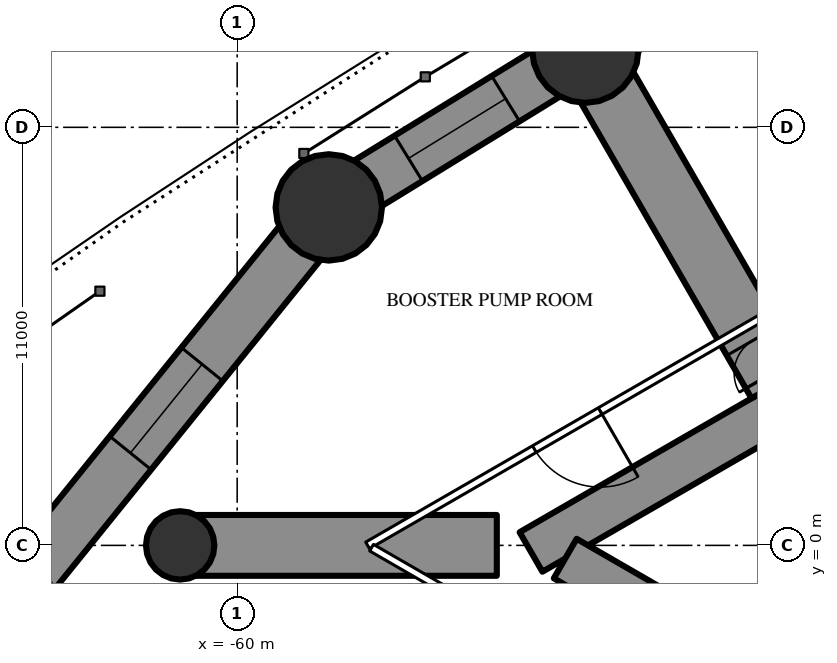
"""IFC4 building model, lengths in metres.
Left out: names, types, materials, properties, quantities, classifications, styles, units other than length and angle.
Written with IfcOpenShell. Run it as: python <this file> out.ifc"""

import sys

from ifc_helpers import new_model, si_unit, direction, frame, frame_2d, origin, origin_2d, place, context, subcontext, project, spatial, rectangle, circle, extrude, element, fill, save


model = new_model("IFC4")
c1 = context("Model", 3, precision=1e-05, world=origin(), true_north=direction((0.0, 1.0)))
c2 = subcontext(c1, "Body", "Model", "MODEL_VIEW")
j1 = project(units=[si_unit("LENGTHUNIT", "METRE"), si_unit("PLANEANGLEUNIT", "RADIAN")], contexts=[c1])
p1 = place(None, origin())
s1 = spatial("IfcSite", under=j1, at=p1, CompositionType="ELEMENT")
p2 = place(p1, origin())
s2 = spatial("IfcBuilding", under=s1, at=p2, CompositionType="ELEMENT")
p3 = place(p2, frame((0.0, 0.0, 152.7)))
s3 = spatial("IfcBuildingStorey", under=s2, at=p3, CompositionType="ELEMENT", Elevation=152.7)
for number, where, z_axis, x_axis in (
    (1, (-66.143, -1.695, 0.0), (0.0, 0.0, 1.0), (1.0, 0.0, 0.0)),
    (2, (-50.839, 13.043, 0.0), (0.0, 0.0, 1.0), (1.0, 0.0, 0.0)),
    (3, (-57.59, 8.893, 0.0), (0.0, 0.0, 1.0), (1.0, 0.0, 0.0)),
):
    element("IfcColumn", number, at=place(p3, frame(where, z_axis=z_axis, x_axis=x_axis)), inside=s3, PredefinedType="COLUMN", context=c2, shape_type="SweptSolid", body=[
        extrude(circle(Radius=1.4, at=origin_2d()), origin(), (0.0, 0.0, 1.0), 3.6),
    ])
p4 = place(p3, frame((-61.5, 0.0, 0.0), z_axis=(0.0, 0.0, 1.0), x_axis=(1.0, 0.0, 0.0)))
e4 = element("IfcColumn", 4, at=p4, inside=s3, PredefinedType="COLUMN", context=c2, shape_type="SweptSolid", body=[
    extrude(circle(Radius=0.9, at=origin_2d()), origin(), (0.0, 0.0, 1.0), 3.6),
])
p5 = place(p3, frame((-27.2, 14.3, 0.0), z_axis=(0.0, 0.0, 1.0), x_axis=(-0.866026593062, -0.499997940104, 0.0)))
e5 = element("IfcWall", 5, at=p5, inside=s3, PredefinedType="SHEAR", context=c2, shape_type="SweptSolid", body=[
    extrude(rectangle(XDim=28.946, YDim=1.2, at=frame_2d((14.473, 0.0))), origin(), (0.0, 0.0, 1.0), 3.6),
])
p6 = place(p5, frame((4.6, 0.0, 0.0)))
e6 = element("IfcOpeningElement", 6, at=p6, cuts=e5, PredefinedType="OPENING", context=c2, shape_type="SweptSolid", body=[
    extrude(rectangle(XDim=1.0, YDim=2.2, at=frame_2d((0.5, 1.1))), frame((0.0, 0.61, 0.0), z_axis=(0.0, -1.0, 0.0), x_axis=(1.0, 0.0, 0.0)), (0.0, 0.0, 1.0), 1.22),
])
p7 = place(p5, frame((13.568, 0.0, 0.0)))
e7 = element("IfcOpeningElement", 7, at=p7, cuts=e5, PredefinedType="OPENING", context=c2, shape_type="SweptSolid", body=[
    extrude(rectangle(XDim=1.8, YDim=2.04, at=frame_2d((0.9, 1.02))), frame((0.0, 0.61, 0.0), z_axis=(0.0, -1.0, 0.0), x_axis=(1.0, 0.0, 0.0)), (0.0, 0.0, 1.0), 1.22),
])
p8 = place(p3, frame((-27.2, -14.3, 0.0), z_axis=(0.0, 0.0, 1.0), x_axis=(-0.866024021859, 0.500002393557, 0.0)))
e8 = element("IfcWall", 8, at=p8, inside=s3, PredefinedType="SHEAR", context=c2, shape_type="SweptSolid", body=[
    extrude(rectangle(XDim=27.907, YDim=1.2, at=frame_2d((13.954, 0.0))), origin(), (0.0, 0.0, 1.0), 3.6),
])
p9 = place(p8, frame((4.6, 0.0, 0.0)))
e9 = element("IfcOpeningElement", 9, at=p9, cuts=e8, PredefinedType="OPENING", context=c2, shape_type="SweptSolid", body=[
    extrude(rectangle(XDim=1.0, YDim=2.2, at=frame_2d((0.5, 1.1))), frame((0.0, 0.61, 0.0), z_axis=(0.0, -1.0, 0.0), x_axis=(1.0, 0.0, 0.0)), (0.0, 0.0, 1.0), 1.22),
])
p10 = place(p8, frame((13.818, 0.0, 0.0)))
e10 = element("IfcOpeningElement", 10, at=p10, cuts=e8, PredefinedType="OPENING", context=c2, shape_type="SweptSolid", body=[
    extrude(rectangle(XDim=1.8, YDim=2.2, at=frame_2d((0.9, 1.1))), frame((0.0, 0.61, 0.0), z_axis=(0.0, -1.0, 0.0), x_axis=(1.0, 0.0, 0.0)), (0.0, 0.0, 1.0), 1.22),
])
p11 = place(p3, frame((-45.773, 4.27, 0.0), z_axis=(0.0, 0.0, 1.0), x_axis=(-0.499995723283, 0.866027872934, 0.0)))
e11 = element("IfcWall", 11, at=p11, inside=s3, PredefinedType="SHEAR", context=c2, shape_type="SweptSolid", body=[
    extrude(rectangle(XDim=10.131, YDim=1.6, at=frame_2d((5.065, 0.0))), origin(), (0.0, 0.0, 1.0), 3.6),
])
p12 = place(p11, frame((0.3, 0.0, 0.0)))
e12 = element("IfcOpeningElement", 12, at=p12, cuts=e11, PredefinedType="OPENING", context=c2, shape_type="SweptSolid", body=[
    extrude(rectangle(XDim=1.0, YDim=2.2, at=frame_2d((0.5, 1.1))), frame((0.0, 0.81, 0.0), z_axis=(0.0, -1.0, 0.0), x_axis=(1.0, 0.0, 0.0)), (0.0, 0.0, 1.0), 1.62),
])
p13 = place(p3, frame((-53.168, 0.0, 0.0), z_axis=(0.0, 0.0, 1.0), x_axis=(-1.0, 0.0, 0.0)))
e13 = element("IfcWall", 13, at=p13, inside=s3, PredefinedType="SHEAR", context=c2, shape_type="SweptSolid", body=[
    extrude(rectangle(XDim=8.332, YDim=1.6, at=frame_2d((4.166, 0.0))), origin(), (0.0, 0.0, 1.0), 3.6),
])
p14 = place(p3, frame((-43.9, 16.871, 0.0), z_axis=(0.0, 0.0, 1.0), x_axis=(-0.875577684027, -0.483077342911, 0.0)))
e14 = element("IfcWall", 14, at=p14, inside=s3, PredefinedType="SHEAR", context=c2, shape_type="SweptSolid", body=[
    extrude(rectangle(XDim=7.925, YDim=1.4, at=frame_2d((3.962, 0.0))), origin(), (0.0, 0.0, 1.0), 3.6),
])
p15 = place(p14, frame((2.462, 0.0, 0.6)))
e15 = element("IfcOpeningElement", 15, at=p15, cuts=e14, PredefinedType="OPENING", context=c2, shape_type="SweptSolid", body=[
    extrude(rectangle(XDim=3.0, YDim=1.2, at=frame_2d((1.5, 0.6))), frame((0.0, 0.71, 0.0), z_axis=(0.0, -1.0, 0.0), x_axis=(1.0, 0.0, 0.0)), (0.0, 0.0, 1.0), 1.42),
])
p16 = place(p3, frame((-50.839, 13.043, 0.0), z_axis=(0.0, 0.0, 1.0), x_axis=(-0.851892008043, -0.523717487423, 0.0)))
e16 = element("IfcWall", 16, at=p16, inside=s3, PredefinedType="SHEAR", context=c2, shape_type="SweptSolid", body=[
    extrude(rectangle(XDim=7.924, YDim=1.4, at=frame_2d((3.962, 0.0))), origin(), (0.0, 0.0, 1.0), 3.6),
])
p17 = place(p16, frame((2.462, 0.0, 0.6)))
e17 = element("IfcOpeningElement", 17, at=p17, cuts=e16, PredefinedType="OPENING", context=c2, shape_type="SweptSolid", body=[
    extrude(rectangle(XDim=3.0, YDim=1.2, at=frame_2d((1.5, 0.6))), frame((0.0, 0.71, 0.0), z_axis=(0.0, -1.0, 0.0), x_axis=(1.0, 0.0, 0.0)), (0.0, 0.0, 1.0), 1.42),
])
p18 = place(p3, frame((-57.59, 8.893, 0.0), z_axis=(0.0, 0.0, 1.0), x_axis=(-0.628373846765, -0.777911504416, 0.0)))
e18 = element("IfcWall", 18, at=p18, inside=s3, PredefinedType="SHEAR", context=c2, shape_type="SweptSolid", body=[
    extrude(rectangle(XDim=13.611, YDim=1.4, at=frame_2d((6.806, 0.0))), origin(), (0.0, 0.0, 1.0), 3.6),
])
p19 = place(p18, frame((5.306, 0.0, 0.6)))
e19 = element("IfcOpeningElement", 19, at=p19, cuts=e18, PredefinedType="OPENING", context=c2, shape_type="SweptSolid", body=[
    extrude(rectangle(XDim=3.0, YDim=1.2, at=frame_2d((1.5, 0.6))), frame((0.0, 0.71, 0.0), z_axis=(0.0, -1.0, 0.0), x_axis=(1.0, 0.0, 0.0)), (0.0, 0.0, 1.0), 1.42),
])
p20 = place(p3, frame((-27.803, 16.608, 0.0), z_axis=(0.0, 0.0, 1.0), x_axis=(-0.866025851808, -0.499999223999, 0.0)))
e20 = element("IfcWall", 20, at=p20, inside=s3, PredefinedType="PARTITIONING", context=c2, shape_type="SweptSolid", body=[
    extrude(rectangle(XDim=33.215, YDim=0.2, at=frame_2d((16.608, 0.0))), origin(), (0.0, 0.0, 1.0), 3.35),
])
p21 = place(p20, frame((4.584, 0.0, 0.0)))
e21 = element("IfcOpeningElement", 21, at=p21, cuts=e20, PredefinedType="OPENING", context=c2, shape_type="SweptSolid", body=[
    extrude(rectangle(XDim=2.0, YDim=2.4, at=frame_2d((1.0, 1.2))), frame((0.0, 0.11, 0.0), z_axis=(0.0, -1.0, 0.0), x_axis=(1.0, 0.0, 0.0)), (0.0, 0.0, 1.0), 0.22),
])
p22 = place(p20, frame((18.1, 0.0, 0.0)))
e22 = element("IfcOpeningElement", 22, at=p22, cuts=e20, PredefinedType="OPENING", context=c2, shape_type="SweptSolid", body=[
    extrude(rectangle(XDim=2.0, YDim=2.4, at=frame_2d((1.0, 1.2))), frame((0.0, 0.11, 0.0), z_axis=(0.0, -1.0, 0.0), x_axis=(1.0, 0.0, 0.0)), (0.0, 0.0, 1.0), 0.22),
])
p23 = place(p20, frame((26.147, 0.0, 0.0)))
e23 = element("IfcOpeningElement", 23, at=p23, cuts=e20, PredefinedType="OPENING", context=c2, shape_type="SweptSolid", body=[
    extrude(rectangle(XDim=2.0, YDim=2.4, at=frame_2d((1.0, 1.2))), frame((0.0, 0.11, 0.0), z_axis=(0.0, -1.0, 0.0), x_axis=(1.0, 0.0, 0.0)), (0.0, 0.0, 1.0), 0.22),
])
p24 = place(p3, frame((-44.715, -6.844, 0.0), z_axis=(0.0, 0.0, 1.0), x_axis=(-0.866025261224, 0.500000246922, 0.0)))
e24 = element("IfcWall", 24, at=p24, inside=s3, PredefinedType="PARTITIONING", context=c2, shape_type="SweptSolid", body=[
    extrude(rectangle(XDim=13.567, YDim=0.2, at=frame_2d((6.783, 0.0))), origin(), (0.0, 0.0, 1.0), 3.35),
])
p25 = place(p24, frame((6.719, 0.0, 0.0)))
e25 = element("IfcOpeningElement", 25, at=p25, cuts=e24, PredefinedType="OPENING", context=c2, shape_type="SweptSolid", body=[
    extrude(rectangle(XDim=1.8, YDim=2.2, at=frame_2d((0.9, 1.1))), frame((0.0, 0.11, 0.0), z_axis=(0.0, -1.0, 0.0), x_axis=(1.0, 0.0, 0.0)), (0.0, 0.0, 1.0), 0.22),
])
p26 = place(p17, origin())
e26 = element("IfcWindow", 26, at=p26, inside=s3, PartitioningType="SINGLE_PANEL", PredefinedType="WINDOW", context=c2, shape_type="SweptSolid", body=[
    extrude(rectangle(XDim=3.0, YDim=1.2, at=frame_2d((1.5, 0.6))), frame((0.0, 0.03, 0.0), z_axis=(0.0, -1.0, 0.0), x_axis=(1.0, 0.0, 0.0)), (0.0, 0.0, 1.0), 0.06),
])
fill(e17, e26)
p27 = place(p19, origin())
e27 = element("IfcWindow", 27, at=p27, inside=s3, PartitioningType="SINGLE_PANEL", PredefinedType="WINDOW", context=c2, shape_type="SweptSolid", body=[
    extrude(rectangle(XDim=3.0, YDim=1.2, at=frame_2d((1.5, 0.6))), frame((0.0, 0.03, 0.0), z_axis=(0.0, -1.0, 0.0), x_axis=(1.0, 0.0, 0.0)), (0.0, 0.0, 1.0), 0.06),
])
fill(e19, e27)
p28 = place(p12, origin())
e28 = element("IfcDoor", 28, at=p28, inside=s3, OperationType="SINGLE_SWING_LEFT", PredefinedType="DOOR", context=c2, shape_type="SweptSolid", body=[
    extrude(rectangle(XDim=1.0, YDim=2.2, at=frame_2d((0.5, 1.1))), frame((0.0, 0.025, 0.0), z_axis=(0.0, -1.0, 0.0), x_axis=(1.0, 0.0, 0.0)), (0.0, 0.0, 1.0), 0.05),
])
fill(e12, e28)
p29 = place(p23, origin())
e29 = element("IfcDoor", 29, at=p29, inside=s3, OperationType="DOUBLE_DOOR_SINGLE_SWING", PredefinedType="DOOR", context=c2, shape_type="SweptSolid", body=[
    extrude(rectangle(XDim=2.0, YDim=2.4, at=frame_2d((1.0, 1.2))), frame((0.0, 0.025, 0.0), z_axis=(0.0, -1.0, 0.0), x_axis=(1.0, 0.0, 0.0)), (0.0, 0.0, 1.0), 0.05),
])
fill(e23, e29)
save(model, sys.argv[1])
